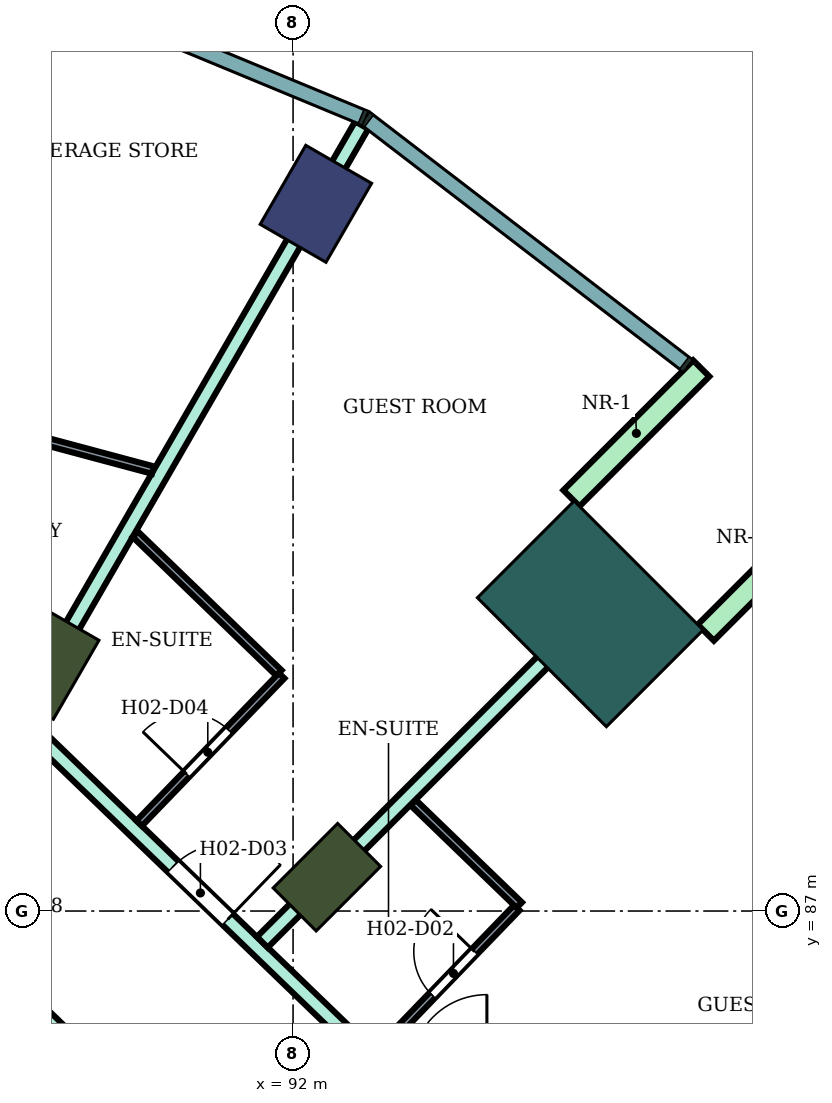
"""IFC4 building model, lengths in metres.
Left out: names, types, materials, properties, quantities, classifications, styles, units other than length and angle.
Written with IfcOpenShell. Run it as: python <this file> out.ifc"""

import sys

from ifc_helpers import new_model, si_unit, direction, frame, frame_2d, origin, origin_2d, place, context, subcontext, project, spatial, rectangle, extrude, element, fill, save


model = new_model("IFC4")
c1 = context("Model", 3, precision=1e-05, world=origin(), true_north=direction((0.0, 1.0)))
c2 = subcontext(c1, "Body", "Model", "MODEL_VIEW")
j1 = project(units=[si_unit("LENGTHUNIT", "METRE"), si_unit("PLANEANGLEUNIT", "RADIAN")], contexts=[c1])
p1 = place(None, origin())
s1 = spatial("IfcSite", under=j1, at=p1, CompositionType="ELEMENT")
p2 = place(p1, origin())
s2 = spatial("IfcBuilding", under=s1, at=p2, CompositionType="ELEMENT")
p3 = place(p2, frame((0.0, 0.0, 47.8)))
s3 = spatial("IfcBuildingStorey", under=s2, at=p3, CompositionType="ELEMENT", Elevation=47.8)
p4 = place(p3, frame((92.3, 96.304, 0.0), z_axis=(0.0, 0.0, 1.0), x_axis=(0.5, 0.866025403784, 0.0)))
e1 = element("IfcColumn", 1, at=p4, inside=s3, PredefinedType="COLUMN", context=c2, shape_type="SweptSolid", body=[
    extrude(rectangle(XDim=1.2, YDim=1.0, at=origin_2d()), origin(), (0.0, 0.0, 1.0), 3.8),
])
for number, where, z_axis, x_axis in (
    (2, (92.445, 87.445, 0.0), (0.0, 0.0, 1.0), (0.707, 0.707, 0.0)),
    (3, (88.8, 90.242, 0.0), (0.0, 0.0, 1.0), (0.5, 0.866, 0.0)),
):
    element("IfcColumn", number, at=place(p3, frame(where, z_axis=z_axis, x_axis=x_axis)), inside=s3, PredefinedType="COLUMN", context=c2, shape_type="SweptSolid", body=[
        extrude(rectangle(XDim=1.2, YDim=0.8, at=origin_2d()), origin(), (0.0, 0.0, 1.0), 3.8),
    ])
p5 = place(p3, frame((95.91, 90.91, 0.0), z_axis=(0.0, 0.0, 1.0), x_axis=(0.707106781187, 0.707106781187, 0.0)))
e4 = element("IfcColumn", 4, at=p5, inside=s3, PredefinedType="COLUMN", context=c2, shape_type="SweptSolid", body=[
    extrude(rectangle(XDim=1.8, YDim=2.4, at=origin_2d()), origin(), (0.0, 0.0, 1.0), 3.8),
])
for number, where, z_axis, x_axis in (
    (5, (97.43, 90.662, 0.0), (0.0, 0.0, 1.0), (0.707, 0.707, 0.0)),
    (6, (95.662, 92.43, 0.0), (0.0, 0.0, 1.0), (0.707, 0.707, 0.0)),
):
    element("IfcWall", number, at=place(p3, frame(where, z_axis=z_axis, x_axis=x_axis)), inside=s3, PredefinedType="NOTDEFINED", context=c2, shape_type="SweptSolid", body=[
        extrude(rectangle(XDim=2.416, YDim=0.3, at=frame_2d((1.208, 0.0))), origin(), (0.0, 0.0, 1.0), 3.8),
    ])
p6 = place(p3, frame((87.064, 87.211, 0.0), z_axis=(0.0, 0.0, 1.0), x_axis=(0.719540958932, -0.694450004262, 0.0)))
e7 = element("IfcWall", 7, at=p6, inside=s3, PredefinedType="PARTITIONING", context=c2, shape_type="SweptSolid", body=[
    extrude(rectangle(XDim=5.488, YDim=0.2, at=frame_2d((2.744, 0.0))), origin(), (0.0, 0.0, 1.0), 3.35),
])
p7 = place(p6, frame((0.55, 0.0, 0.0)))
e8 = element("IfcOpeningElement", 8, at=p7, cuts=e7, PredefinedType="OPENING", context=c2, shape_type="SweptSolid", body=[
    extrude(rectangle(XDim=1.0, YDim=2.1, at=frame_2d((0.5, 1.05))), frame((0.0, 0.11, 0.0), z_axis=(0.0, -1.0, 0.0), x_axis=(1.0, 0.0, 0.0)), (0.0, 0.0, 1.0), 0.22),
])
p8 = place(p3, frame((88.465, 89.473, 0.0), z_axis=(0.0, 0.0, 1.0), x_axis=(0.719474304909, -0.694519059908, 0.0)))
e9 = element("IfcWall", 9, at=p8, inside=s3, PredefinedType="PARTITIONING", context=c2, shape_type="SweptSolid", body=[
    extrude(rectangle(XDim=6.525, YDim=0.2, at=frame_2d((3.263, 0.0))), origin(), (0.0, 0.0, 1.0), 3.35),
])
p9 = place(p8, frame((2.719, 0.0, 0.0)))
e10 = element("IfcOpeningElement", 10, at=p9, cuts=e9, PredefinedType="OPENING", context=c2, shape_type="SweptSolid", body=[
    extrude(rectangle(XDim=1.0, YDim=2.1, at=frame_2d((0.5, 1.05))), frame((0.0, 0.11, 0.0), z_axis=(0.0, -1.0, 0.0), x_axis=(1.0, 0.0, 0.0)), (0.0, 0.0, 1.0), 0.22),
])
p10 = place(p3, frame((88.397, 89.539, 0.0), z_axis=(0.0, 0.0, 1.0), x_axis=(0.500228379329, 0.86589350876, 0.0)))
e11 = element("IfcWall", 11, at=p10, inside=s3, PredefinedType="PARTITIONING", context=c2, shape_type="SweptSolid", body=[
    extrude(rectangle(XDim=9.008, YDim=0.2, at=frame_2d((4.504, 0.0))), origin(), (0.0, 0.0, 1.0), 3.35),
])
p11 = place(p3, frame((91.595, 86.59, 0.0), z_axis=(0.0, 0.0, 1.0), x_axis=(0.707232337591, 0.706981202484, 0.0)))
e12 = element("IfcWall", 12, at=p11, inside=s3, PredefinedType="PARTITIONING", context=c2, shape_type="SweptSolid", body=[
    extrude(rectangle(XDim=6.805, YDim=0.2, at=frame_2d((3.402, 0.0))), origin(), (0.0, 0.0, 1.0), 3.35),
])
p12 = place(p3, frame((85.237, 94.119, 0.0), z_axis=(0.0, 0.0, 1.0), x_axis=(0.965923866142, -0.258826360359, 0.0)))
e13 = element("IfcWall", 13, at=p12, inside=s3, PredefinedType="PARTITIONING", context=c2, shape_type="SweptSolid", body=[
    extrude(rectangle(XDim=5.092, YDim=0.1, at=frame_2d((2.546, 0.0))), origin(), (0.0, 0.0, 1.0), 3.35),
])
p13 = place(p12, frame((2.096, 0.0, 0.0)))
e14 = element("IfcOpeningElement", 14, at=p13, cuts=e13, PredefinedType="OPENING", context=c2, shape_type="SweptSolid", body=[
    extrude(rectangle(XDim=0.9, YDim=2.1, at=frame_2d((0.45, 1.05))), frame((0.0, 0.06, 0.0), z_axis=(0.0, -1.0, 0.0), x_axis=(1.0, 0.0, 0.0)), (0.0, 0.0, 1.0), 0.12),
])
p14 = place(p3, frame((89.925, 91.956, 0.0), z_axis=(0.0, 0.0, 1.0), x_axis=(0.71931338148, -0.694685726947, 0.0)))
e15 = element("IfcWall", 15, at=p14, inside=s3, PredefinedType="PARTITIONING", context=c2, shape_type="SweptSolid", body=[
    extrude(rectangle(XDim=2.627, YDim=0.1, at=frame_2d((1.313, 0.0))), origin(), (0.0, 0.0, 1.0), 3.35),
])
p15 = place(p3, frame((89.976, 88.154, 0.0), z_axis=(0.0, 0.0, 1.0), x_axis=(0.6945137956, 0.719479386585, 0.0)))
e16 = element("IfcWall", 16, at=p15, inside=s3, PredefinedType="PARTITIONING", context=c2, shape_type="SweptSolid", body=[
    extrude(rectangle(XDim=2.699, YDim=0.1, at=frame_2d((1.35, 0.0))), origin(), (0.0, 0.0, 1.0), 3.35),
])
p16 = place(p15, frame((0.9, 0.0, 0.0)))
e17 = element("IfcOpeningElement", 17, at=p16, cuts=e16, PredefinedType="OPENING", context=c2, shape_type="SweptSolid", body=[
    extrude(rectangle(XDim=0.8, YDim=2.1, at=frame_2d((0.4, 1.05))), frame((0.0, 0.06, 0.0), z_axis=(0.0, -1.0, 0.0), x_axis=(1.0, 0.0, 0.0)), (0.0, 0.0, 1.0), 0.12),
])
p17 = place(p3, frame((93.104, 85.136, 0.0), z_axis=(0.0, 0.0, 1.0), x_axis=(0.694324808789, 0.719661767708, 0.0)))
e18 = element("IfcWall", 18, at=p17, inside=s3, PredefinedType="PARTITIONING", context=c2, shape_type="SweptSolid", body=[
    extrude(rectangle(XDim=2.65, YDim=0.1, at=frame_2d((1.325, 0.0))), origin(), (0.0, 0.0, 1.0), 3.35),
])
p18 = place(p17, frame((1.05, 0.0, 0.0)))
e19 = element("IfcOpeningElement", 19, at=p18, cuts=e18, PredefinedType="OPENING", context=c2, shape_type="SweptSolid", body=[
    extrude(rectangle(XDim=0.8, YDim=2.1, at=frame_2d((0.4, 1.05))), frame((0.0, 0.06, 0.0), z_axis=(0.0, -1.0, 0.0), x_axis=(1.0, 0.0, 0.0)), (0.0, 0.0, 1.0), 0.12),
])
p19 = place(p3, frame((93.582, 88.425, 0.0), z_axis=(0.0, 0.0, 1.0), x_axis=(0.719334224501, -0.694664144361, 0.0)))
e20 = element("IfcWall", 20, at=p19, inside=s3, PredefinedType="PARTITIONING", context=c2, shape_type="SweptSolid", body=[
    extrude(rectangle(XDim=1.94, YDim=0.1, at=frame_2d((0.97, 0.0))), origin(), (0.0, 0.0, 1.0), 3.35),
])
p20 = place(p18, origin())
e21 = element("IfcDoor", 21, at=p20, inside=s3, OperationType="SINGLE_SWING_RIGHT", PredefinedType="DOOR", context=c2, shape_type="SweptSolid", body=[
    extrude(rectangle(XDim=0.8, YDim=2.1, at=frame_2d((0.4, 1.05))), frame((0.0, 0.025, 0.0), z_axis=(0.0, -1.0, 0.0), x_axis=(1.0, 0.0, 0.0)), (0.0, 0.0, 1.0), 0.05),
])
fill(e19, e21)
p21 = place(p9, origin())
e22 = element("IfcDoor", 22, at=p21, inside=s3, OperationType="SINGLE_SWING_RIGHT", PredefinedType="DOOR", context=c2, shape_type="SweptSolid", body=[
    extrude(rectangle(XDim=1.0, YDim=2.1, at=frame_2d((0.5, 1.05))), frame((0.0, 0.025, 0.0), z_axis=(0.0, -1.0, 0.0), x_axis=(1.0, 0.0, 0.0)), (0.0, 0.0, 1.0), 0.05),
])
fill(e10, e22)
p22 = place(p16, origin())
e23 = element("IfcDoor", 23, at=p22, inside=s3, OperationType="SINGLE_SWING_LEFT", PredefinedType="DOOR", context=c2, shape_type="SweptSolid", body=[
    extrude(rectangle(XDim=0.8, YDim=2.1, at=frame_2d((0.4, 1.05))), frame((0.0, 0.025, 0.0), z_axis=(0.0, -1.0, 0.0), x_axis=(1.0, 0.0, 0.0)), (0.0, 0.0, 1.0), 0.05),
])
fill(e17, e23)
save(model, sys.argv[1])
